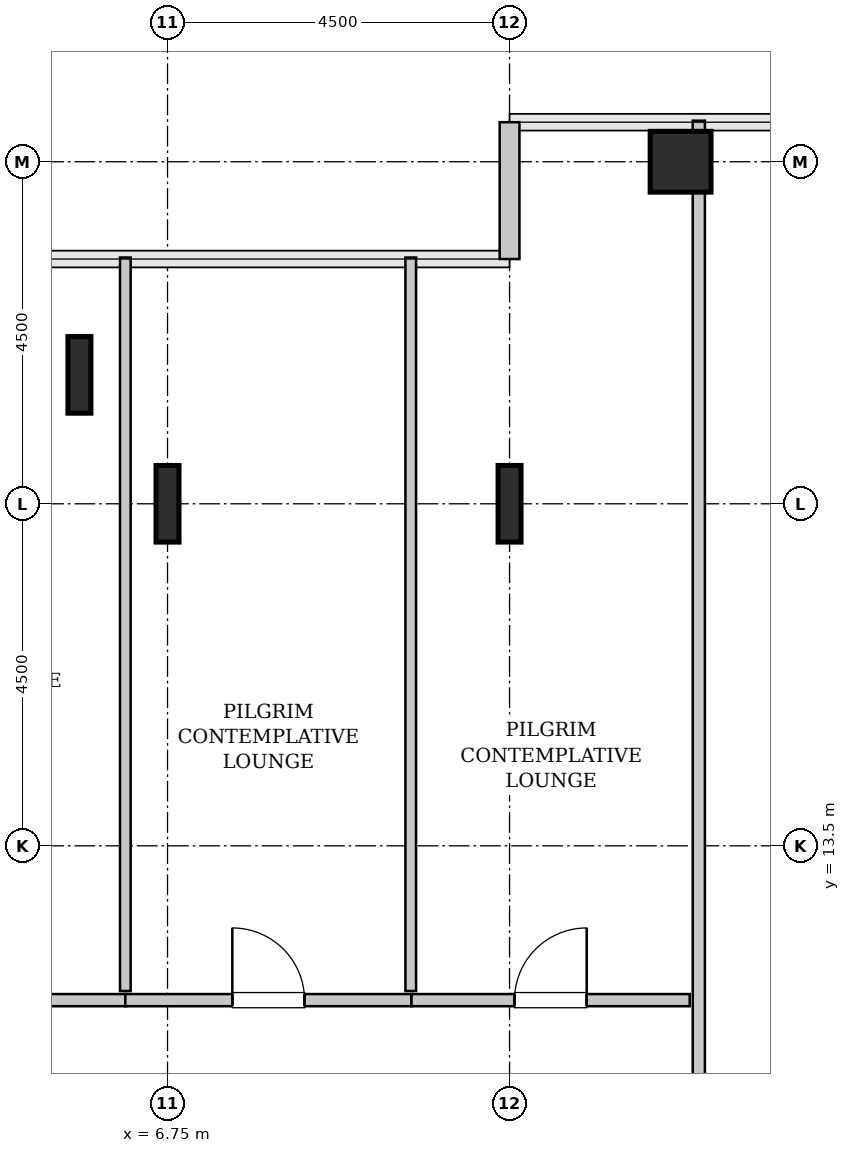
"""IFC4 building model, lengths in metres.
Left out: names, types, materials, properties, quantities, classifications, styles, units other than length and angle.
Written with IfcOpenShell. Run it as: python <this file> out.ifc"""

import sys

from ifc_helpers import new_model, si_unit, direction, frame, frame_2d, origin, origin_2d, place, context, subcontext, project, spatial, rectangle, hollow_rectangle, i_section, extrude, source, transform, mapped, element, fill, save


model = new_model("IFC4")
c1 = context("Model", 3, precision=1e-05, world=origin(), true_north=direction((0.0, 1.0)))
c2 = subcontext(c1, "Body", "Model", "MODEL_VIEW")
j1 = project(units=[si_unit("LENGTHUNIT", "METRE"), si_unit("PLANEANGLEUNIT", "RADIAN")], contexts=[c1])
p1 = place(None, origin())
s1 = spatial("IfcSite", under=j1, at=p1, CompositionType="ELEMENT")
p2 = place(p1, origin())
s2 = spatial("IfcBuilding", under=s1, at=p2, CompositionType="ELEMENT")
p3 = place(p2, frame((0.0, 0.0, 117.4)))
s3 = spatial("IfcBuildingStorey", under=s2, at=p3, CompositionType="ELEMENT", Elevation=117.4)
m1 = source(origin(), c2, "Body", "SweptSolid", [
    extrude(i_section(OverallWidth=0.302, OverallDepth=1.008, WebThickness=0.021, FlangeThickness=0.04, FilletRadius=0.03, at=origin_2d()), origin(), (0.0, 0.0, 1.0), 3.8),
])
for number, where, z_axis, x_axis in (
    (1, (5.591, 19.696, 0.0), (0.0, 0.0, 1.0), (1.0, 0.0, 0.0)),
    (2, (6.75, 18.0, 0.0), (0.0, 0.0, 1.0), (1.0, 0.0, 0.0)),
    (3, (11.25, 18.0, 0.0), (0.0, 0.0, 1.0), (1.0, 0.0, 0.0)),
):
    element("IfcColumn", number, at=place(p3, frame(where, z_axis=z_axis, x_axis=x_axis)), inside=s3, PredefinedType="COLUMN", context=c2, shape_type="MappedRepresentation", body=[
        mapped(m1, transform((0.0, 0.0, 0.0), x_axis=(1.0, 0.0, 0.0), y_axis=(0.0, 1.0, 0.0), z_axis=(0.0, 0.0, 1.0), scale=1.0)),
    ])
m2 = source(origin(), c2, "Body", "SweptSolid", [
    extrude(hollow_rectangle(XDim=0.8, YDim=0.8, WallThickness=0.04, InnerFilletRadius=0.04, OuterFilletRadius=0.08, at=origin_2d()), origin(), (0.0, 0.0, 1.0), 3.8),
])
p4 = place(p3, frame((13.5, 22.5, 0.0), z_axis=(0.0, 0.0, 1.0), x_axis=(1.0, 0.0, 0.0)))
e4 = element("IfcColumn", 4, at=p4, inside=s3, PredefinedType="COLUMN", context=c2, shape_type="MappedRepresentation", body=[
    mapped(m2, transform((0.0, 0.0, 0.0), x_axis=(1.0, 0.0, 0.0), y_axis=(0.0, 1.0, 0.0), z_axis=(0.0, 0.0, 1.0), scale=1.0)),
])
m3 = source(origin(), c2, "Body", "SweptSolid", [
    extrude(rectangle(XDim=1.8, YDim=0.26, at=frame_2d((0.9, 0.0))), origin(), (0.0, 0.0, 1.0), 3.55),
])
p5 = place(p3, frame((11.25, 23.02, 0.0), z_axis=(0.0, 0.0, 1.0), x_axis=(0.0, -1.0, 0.0)))
e5 = element("IfcWall", 5, at=p5, inside=s3, PredefinedType="SOLIDWALL", context=c2, shape_type="MappedRepresentation", body=[
    mapped(m3, transform((0.0, 0.0, 0.0), x_axis=(1.0, 0.0, 0.0), y_axis=(0.0, 1.0, 0.0), z_axis=(0.0, 0.0, 1.0), scale=1.0)),
])
m4 = source(origin(), c2, "Body", "SweptSolid", [
    extrude(rectangle(XDim=15.135, YDim=0.16, at=frame_2d((7.567, 0.0))), origin(), (0.0, 0.0, 1.0), 3.535),
])
p6 = place(p3, frame((13.74, 7.905, 0.0), z_axis=(0.0, 0.0, 1.0), x_axis=(0.0, 1.0, 0.0)))
e6 = element("IfcWall", 6, at=p6, inside=s3, PredefinedType="PARTITIONING", context=c2, shape_type="MappedRepresentation", body=[
    mapped(m4, transform((0.0, 0.0, 0.0), x_axis=(1.0, 0.0, 0.0), y_axis=(0.0, 1.0, 0.0), z_axis=(0.0, 0.0, 1.0), scale=1.0)),
])
p7 = place(p6, frame((1.327, 0.0, 0.0)))
e7 = element("IfcOpeningElement", 7, at=p7, cuts=e6, PredefinedType="OPENING", context=c2, shape_type="SweptSolid", body=[
    extrude(rectangle(XDim=0.95, YDim=2.1, at=frame_2d((0.475, 1.05))), frame((0.0, 0.09, 0.0), z_axis=(0.0, -1.0, 0.0), x_axis=(1.0, 0.0, 0.0)), (0.0, 0.0, 1.0), 0.18),
])
m5 = source(origin(), c2, "Body", "SweptSolid", [
    extrude(rectangle(XDim=4.005, YDim=0.16, at=frame_2d((2.002, 0.0))), origin(), (0.0, 0.0, 1.0), 3.535),
])
p8 = place(p3, frame((2.2, 11.47, 0.0), z_axis=(0.0, 0.0, 1.0), x_axis=(1.0, 0.0, 0.0)))
e8 = element("IfcWall", 8, at=p8, inside=s3, PredefinedType="PARTITIONING", context=c2, shape_type="MappedRepresentation", body=[
    mapped(m5, transform((0.0, 0.0, 0.0), x_axis=(1.0, 0.0, 0.0), y_axis=(0.0, 1.0, 0.0), z_axis=(0.0, 0.0, 1.0), scale=1.0)),
])
p9 = place(p8, frame((1.528, 0.0, 0.0)))
e9 = element("IfcOpeningElement", 9, at=p9, cuts=e8, PredefinedType="OPENING", context=c2, shape_type="SweptSolid", body=[
    extrude(rectangle(XDim=0.95, YDim=2.1, at=frame_2d((0.475, 1.05))), frame((0.0, 0.09, 0.0), z_axis=(0.0, -1.0, 0.0), x_axis=(1.0, 0.0, 0.0)), (0.0, 0.0, 1.0), 0.18),
])
m6 = source(origin(), c2, "Body", "SweptSolid", [
    extrude(rectangle(XDim=9.65, YDim=0.14, at=frame_2d((4.825, 0.0))), origin(), (0.0, 0.0, 1.0), 3.535),
])
p10 = place(p3, frame((6.195, 11.59, 0.0), z_axis=(0.0, 0.0, 1.0), x_axis=(0.0, 1.0, 0.0)))
e10 = element("IfcWall", 10, at=p10, inside=s3, PredefinedType="PARTITIONING", context=c2, shape_type="MappedRepresentation", body=[
    mapped(m6, transform((0.0, 0.0, 0.0), x_axis=(1.0, 0.0, 0.0), y_axis=(0.0, 1.0, 0.0), z_axis=(0.0, 0.0, 1.0), scale=1.0)),
])
m7 = source(origin(), c2, "Body", "SweptSolid", [
    extrude(rectangle(XDim=3.765, YDim=0.16, at=frame_2d((1.882, 0.0))), origin(), (0.0, 0.0, 1.0), 3.535),
])
p11 = place(p3, frame((6.195, 11.47, 0.0), z_axis=(0.0, 0.0, 1.0), x_axis=(1.0, 0.0, 0.0)))
e11 = element("IfcWall", 11, at=p11, inside=s3, PredefinedType="PARTITIONING", context=c2, shape_type="MappedRepresentation", body=[
    mapped(m7, transform((0.0, 0.0, 0.0), x_axis=(1.0, 0.0, 0.0), y_axis=(0.0, 1.0, 0.0), z_axis=(0.0, 0.0, 1.0), scale=1.0)),
])
p12 = place(p11, frame((1.407, 0.0, 0.0)))
e12 = element("IfcOpeningElement", 12, at=p12, cuts=e11, PredefinedType="OPENING", context=c2, shape_type="SweptSolid", body=[
    extrude(rectangle(XDim=0.95, YDim=2.1, at=frame_2d((0.475, 1.05))), frame((0.0, 0.09, 0.0), z_axis=(0.0, -1.0, 0.0), x_axis=(1.0, 0.0, 0.0)), (0.0, 0.0, 1.0), 0.18),
])
p13 = place(p3, frame((9.95, 11.59, 0.0), z_axis=(0.0, 0.0, 1.0), x_axis=(0.0, 1.0, 0.0)))
e13 = element("IfcWall", 13, at=p13, inside=s3, PredefinedType="PARTITIONING", context=c2, shape_type="MappedRepresentation", body=[
    mapped(m6, transform((0.0, 0.0, 0.0), x_axis=(1.0, 0.0, 0.0), y_axis=(0.0, 1.0, 0.0), z_axis=(0.0, 0.0, 1.0), scale=1.0)),
])
m8 = source(origin(), c2, "Body", "SweptSolid", [
    extrude(rectangle(XDim=3.66, YDim=0.16, at=frame_2d((1.83, 0.0))), origin(), (0.0, 0.0, 1.0), 3.535),
])
p14 = place(p3, frame((9.96, 11.47, 0.0), z_axis=(0.0, 0.0, 1.0), x_axis=(1.0, 0.0, 0.0)))
e14 = element("IfcWall", 14, at=p14, inside=s3, PredefinedType="PARTITIONING", context=c2, shape_type="MappedRepresentation", body=[
    mapped(m8, transform((0.0, 0.0, 0.0), x_axis=(1.0, 0.0, 0.0), y_axis=(0.0, 1.0, 0.0), z_axis=(0.0, 0.0, 1.0), scale=1.0)),
])
p15 = place(p14, frame((1.355, 0.0, 0.0)))
e15 = element("IfcOpeningElement", 15, at=p15, cuts=e14, PredefinedType="OPENING", context=c2, shape_type="SweptSolid", body=[
    extrude(rectangle(XDim=0.95, YDim=2.1, at=frame_2d((0.475, 1.05))), frame((0.0, 0.09, 0.0), z_axis=(0.0, -1.0, 0.0), x_axis=(1.0, 0.0, 0.0)), (0.0, 0.0, 1.0), 0.18),
])
m9 = source(origin(), c2, "Body", "SweptSolid", [
    extrude(rectangle(XDim=0.95, YDim=2.1, at=frame_2d((0.475, 1.05))), frame((0.0, 0.025, 0.0), z_axis=(0.0, -1.0, 0.0), x_axis=(1.0, 0.0, 0.0)), (0.0, 0.0, 1.0), 0.05),
])
p16 = place(p12, origin())
e16 = element("IfcDoor", 16, at=p16, inside=s3, OperationType="SINGLE_SWING_LEFT", PredefinedType="DOOR", context=c2, shape_type="MappedRepresentation", body=[
    mapped(m9, transform((0.0, 0.0, 0.0), x_axis=(1.0, 0.0, 0.0), y_axis=(0.0, 1.0, 0.0), z_axis=(0.0, 0.0, 1.0), scale=1.0)),
])
fill(e12, e16)
p17 = place(p15, origin())
e17 = element("IfcDoor", 17, at=p17, inside=s3, OperationType="SINGLE_SWING_RIGHT", PredefinedType="DOOR", context=c2, shape_type="MappedRepresentation", body=[
    mapped(m9, transform((0.0, 0.0, 0.0), x_axis=(1.0, 0.0, 0.0), y_axis=(0.0, 1.0, 0.0), z_axis=(0.0, 0.0, 1.0), scale=1.0)),
])
fill(e15, e17)
save(model, sys.argv[1])
